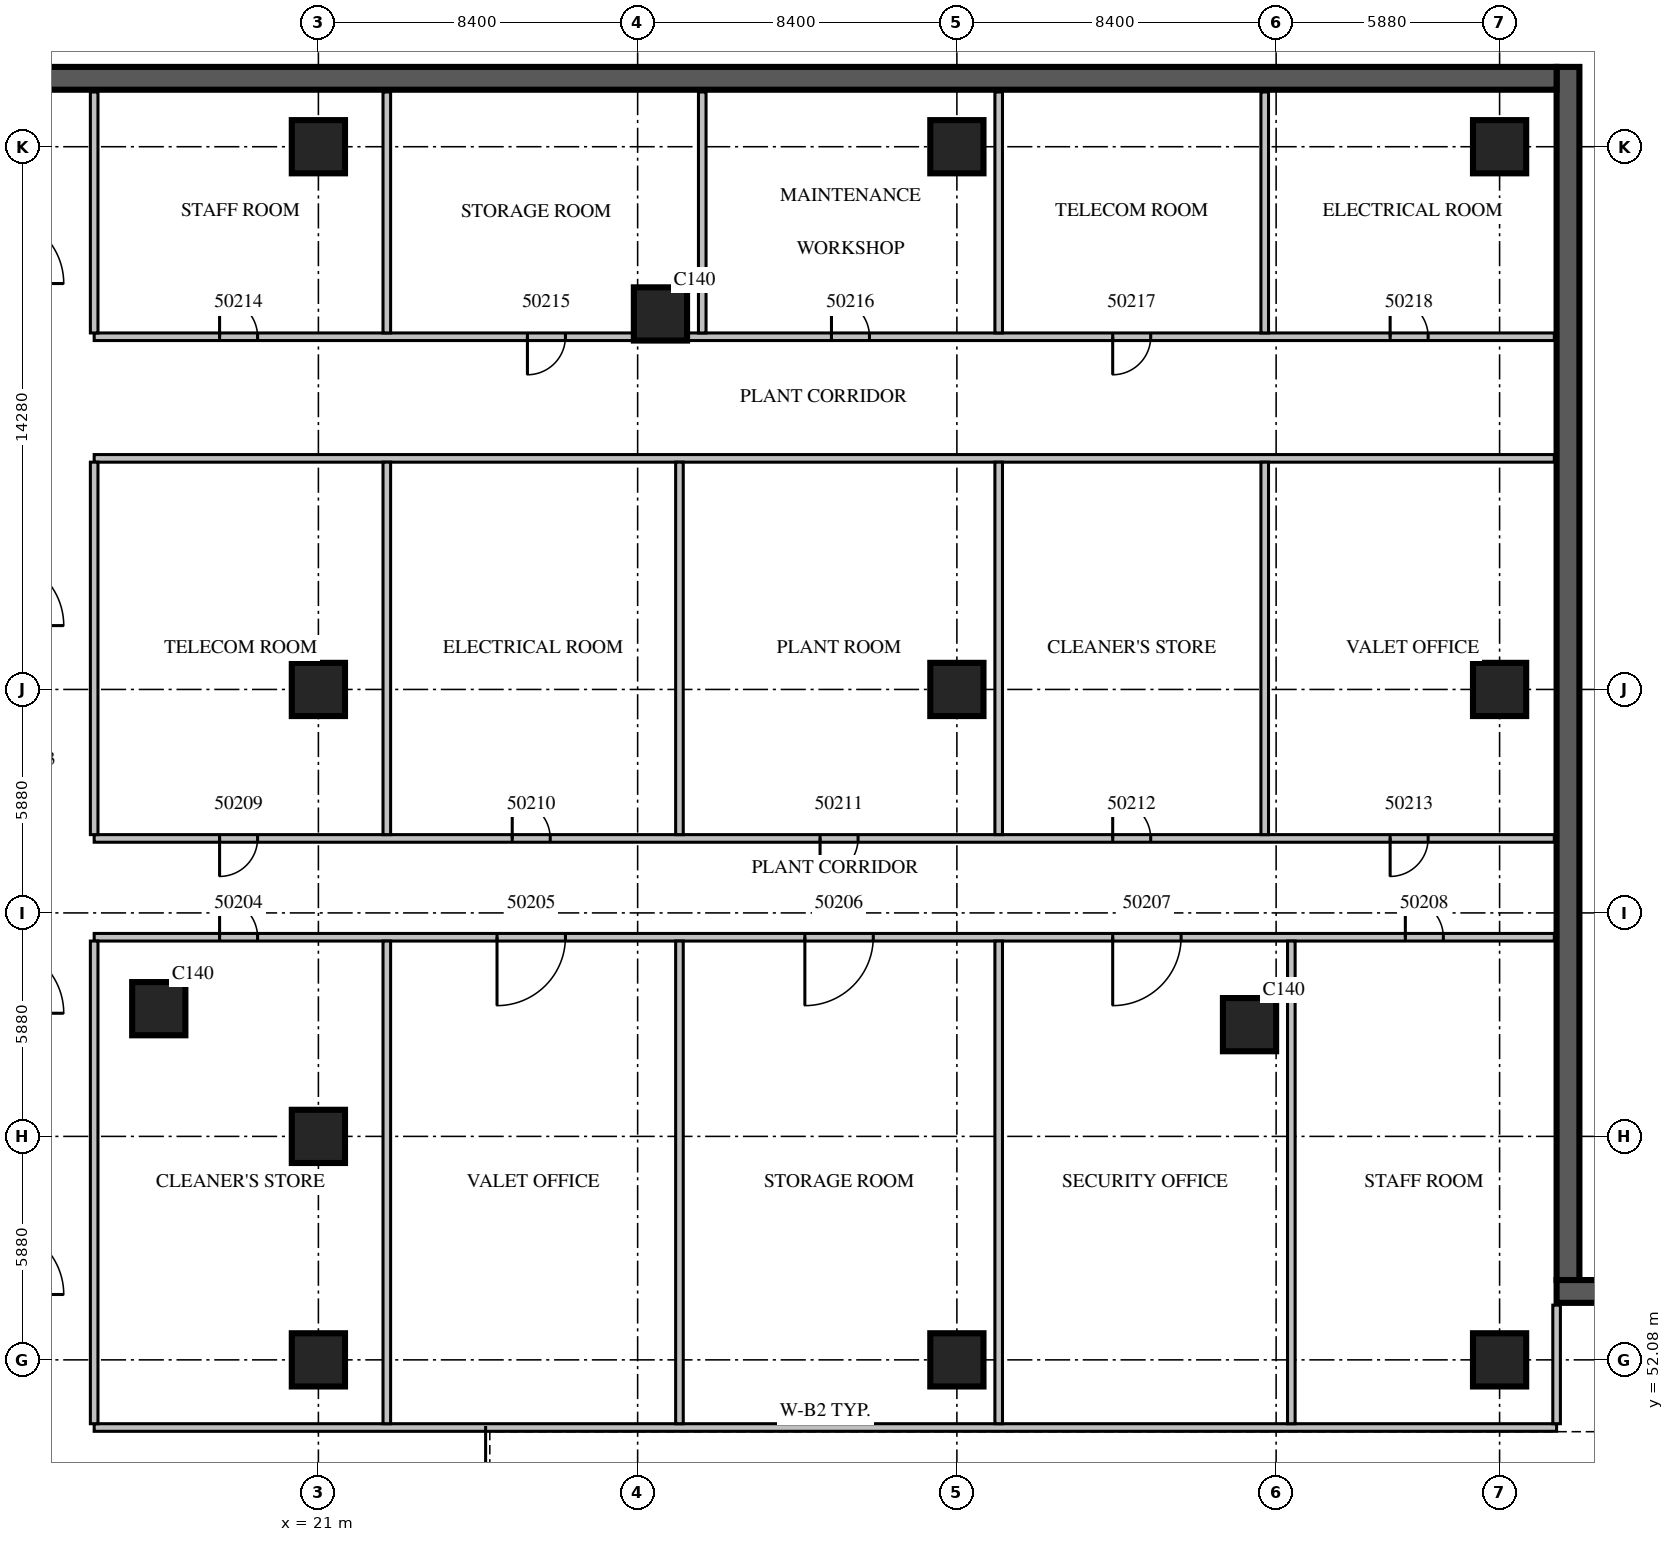
"""IFC4 building model, lengths in metres.
Left out: names, types, materials, properties, quantities, classifications, styles, units other than length and angle.
Written with IfcOpenShell. Run it as: python <this file> out.ifc"""

import sys

from ifc_helpers import new_model, si_unit, direction, frame, frame_2d, origin, origin_2d, place, context, subcontext, project, spatial, rectangle, extrude, source, transform, mapped, element, fill, save


model = new_model("IFC4")
c1 = context("Model", 3, precision=1e-05, world=origin(), true_north=direction((0.0, 1.0)))
c2 = subcontext(c1, "Body", "Model", "MODEL_VIEW")
j1 = project(units=[si_unit("LENGTHUNIT", "METRE"), si_unit("PLANEANGLEUNIT", "RADIAN")], contexts=[c1])
p1 = place(None, origin())
s1 = spatial("IfcSite", under=j1, at=p1, CompositionType="ELEMENT")
p2 = place(p1, origin())
s2 = spatial("IfcBuilding", under=s1, at=p2, CompositionType="ELEMENT")
p3 = place(p2, frame((0.0, 0.0, -4.5)))
s3 = spatial("IfcBuildingStorey", under=s2, at=p3, CompositionType="ELEMENT", Elevation=-4.5)
m1 = source(origin(), c2, "Body", "SweptSolid", [
    extrude(rectangle(XDim=31.92, YDim=0.6, at=frame_2d((15.96, 0.0))), origin(), (0.0, 0.0, 1.0), 4.5),
])
p4 = place(p3, frame((53.88, 54.18, 0.0), z_axis=(0.0, 0.0, 1.0), x_axis=(0.0, 1.0, 0.0)))
e1 = element("IfcWall", 1, at=p4, inside=s3, PredefinedType="SOLIDWALL", context=c2, shape_type="MappedRepresentation", body=[
    mapped(m1, transform((0.0, 0.0, 0.0), scale=1.0)),
])
m2 = source(origin(), c2, "Body", "SweptSolid", [
    extrude(rectangle(XDim=55.68, YDim=0.6, at=frame_2d((27.84, 0.0))), origin(), (0.0, 0.0, 1.0), 4.5),
])
p5 = place(p3, frame((53.58, 85.8, 0.0), z_axis=(0.0, 0.0, 1.0), x_axis=(-1.0, 0.0, 0.0)))
e2 = element("IfcWall", 2, at=p5, inside=s3, PredefinedType="SOLIDWALL", context=c2, shape_type="MappedRepresentation", body=[
    mapped(m2, transform((0.0, 0.0, 0.0), scale=1.0)),
])
p6 = place(p3, frame((85.5, 53.88, 0.0), z_axis=(0.0, 0.0, 1.0), x_axis=(-1.0, 0.0, 0.0)))
e3 = element("IfcWall", 3, at=p6, inside=s3, PredefinedType="SOLIDWALL", context=c2, shape_type="MappedRepresentation", body=[
    mapped(m1, transform((0.0, 0.0, 0.0), scale=1.0)),
])
m3 = source(origin(), c2, "Body", "SweptSolid", [
    extrude(rectangle(XDim=1.4, YDim=1.4, at=origin_2d()), origin(), (0.0, 0.0, 1.0), 4.5),
])
for number, where, z_axis, x_axis in (
    (4, (16.8, 61.32, 0.0), (0.0, 0.0, 1.0), (1.0, 0.0, 0.0)),
    (5, (21.0, 52.08, 0.0), (0.0, 0.0, 1.0), (1.0, 0.0, 0.0)),
    (6, (21.0, 57.96, 0.0), (0.0, 0.0, 1.0), (1.0, 0.0, 0.0)),
    (7, (21.0, 69.72, 0.0), (0.0, 0.0, 1.0), (1.0, 0.0, 0.0)),
    (8, (21.0, 84.0, 0.0), (0.0, 0.0, 1.0), (1.0, 0.0, 0.0)),
    (9, (30.0, 79.6, 0.0), (0.0, 0.0, 1.0), (1.0, 0.0, 0.0)),
    (10, (37.8, 52.08, 0.0), (0.0, 0.0, 1.0), (1.0, 0.0, 0.0)),
    (11, (37.8, 69.72, 0.0), (0.0, 0.0, 1.0), (1.0, 0.0, 0.0)),
    (12, (37.8, 84.0, 0.0), (0.0, 0.0, 1.0), (1.0, 0.0, 0.0)),
    (13, (45.5, 60.9, 0.0), (0.0, 0.0, 1.0), (1.0, 0.0, 0.0)),
    (14, (52.08, 52.08, 0.0), (0.0, 0.0, 1.0), (1.0, 0.0, 0.0)),
    (15, (52.08, 69.72, 0.0), (0.0, 0.0, 1.0), (1.0, 0.0, 0.0)),
    (16, (52.08, 84.0, 0.0), (0.0, 0.0, 1.0), (1.0, 0.0, 0.0)),
):
    element("IfcColumn", number, at=place(p3, frame(where, z_axis=z_axis, x_axis=x_axis)), inside=s3, PredefinedType="COLUMN", context=c2, shape_type="MappedRepresentation", body=[
        mapped(m3, transform((0.0, 0.0, 0.0), scale=1.0)),
    ])
m4 = source(origin(), c2, "Body", "SweptSolid", [
    extrude(rectangle(XDim=38.48, YDim=0.2, at=frame_2d((19.24, 0.0))), origin(), (0.0, 0.0, 1.0), 3.9),
])
p7 = place(p3, frame((15.1, 50.3, 0.0), z_axis=(0.0, 0.0, 1.0), x_axis=(1.0, 0.0, 0.0)))
e17 = element("IfcWall", 17, at=p7, inside=s3, PredefinedType="PARTITIONING", context=c2, shape_type="MappedRepresentation", body=[
    mapped(m4, transform((0.0, 0.0, 0.0), scale=1.0)),
])
m5 = source(origin(), c2, "Body", "SweptSolid", [
    extrude(rectangle(XDim=38.42, YDim=0.2, at=frame_2d((19.21, 0.0))), origin(), (0.0, 0.0, 1.0), 3.9),
])
p8 = place(p3, frame((15.1, 63.2, 0.0), z_axis=(0.0, 0.0, 1.0), x_axis=(1.0, 0.0, 0.0)))
e18 = element("IfcWall", 18, at=p8, inside=s3, PredefinedType="PARTITIONING", context=c2, shape_type="MappedRepresentation", body=[
    mapped(m5, transform((0.0, 0.0, 0.0), scale=1.0)),
])
m6 = source(origin(), c2, "Body", "SweptSolid", [
    extrude(rectangle(XDim=1.0, YDim=2.1, at=frame_2d((0.5, 1.05))), frame((0.0, 0.11, 0.0), z_axis=(0.0, -1.0, 0.0), x_axis=(1.0, 0.0, 0.0)), (0.0, 0.0, 1.0), 0.22),
])
p9 = place(p8, frame((3.3, 0.0, 0.0)))
e19 = element("IfcOpeningElement", 19, at=p9, cuts=e18, PredefinedType="OPENING", context=c2, shape_type="MappedRepresentation", body=[
    mapped(m6, transform((0.0, 0.0, 0.0), scale=1.0)),
])
m7 = source(origin(), c2, "Body", "SweptSolid", [
    extrude(rectangle(XDim=1.8, YDim=2.1, at=frame_2d((0.9, 1.05))), frame((0.0, 0.11, 0.0), z_axis=(0.0, -1.0, 0.0), x_axis=(1.0, 0.0, 0.0)), (0.0, 0.0, 1.0), 0.22),
])
p10 = place(p8, frame((10.6, 0.0, 0.0)))
e20 = element("IfcOpeningElement", 20, at=p10, cuts=e18, PredefinedType="OPENING", context=c2, shape_type="MappedRepresentation", body=[
    mapped(m7, transform((0.0, 0.0, 0.0), scale=1.0)),
])
p11 = place(p8, frame((18.7, 0.0, 0.0)))
e21 = element("IfcOpeningElement", 21, at=p11, cuts=e18, PredefinedType="OPENING", context=c2, shape_type="MappedRepresentation", body=[
    mapped(m7, transform((0.0, 0.0, 0.0), scale=1.0)),
])
p12 = place(p8, frame((26.8, 0.0, 0.0)))
e22 = element("IfcOpeningElement", 22, at=p12, cuts=e18, PredefinedType="OPENING", context=c2, shape_type="MappedRepresentation", body=[
    mapped(m7, transform((0.0, 0.0, 0.0), scale=1.0)),
])
p13 = place(p8, frame((34.5, 0.0, 0.0)))
e23 = element("IfcOpeningElement", 23, at=p13, cuts=e18, PredefinedType="OPENING", context=c2, shape_type="MappedRepresentation", body=[
    mapped(m6, transform((0.0, 0.0, 0.0), scale=1.0)),
])
p14 = place(p3, frame((15.1, 65.8, 0.0), z_axis=(0.0, 0.0, 1.0), x_axis=(1.0, 0.0, 0.0)))
e24 = element("IfcWall", 24, at=p14, inside=s3, PredefinedType="PARTITIONING", context=c2, shape_type="MappedRepresentation", body=[
    mapped(m5, transform((0.0, 0.0, 0.0), scale=1.0)),
])
p15 = place(p14, frame((3.3, 0.0, 0.0)))
e25 = element("IfcOpeningElement", 25, at=p15, cuts=e24, PredefinedType="OPENING", context=c2, shape_type="MappedRepresentation", body=[
    mapped(m6, transform((0.0, 0.0, 0.0), scale=1.0)),
])
p16 = place(p14, frame((11.0, 0.0, 0.0)))
e26 = element("IfcOpeningElement", 26, at=p16, cuts=e24, PredefinedType="OPENING", context=c2, shape_type="MappedRepresentation", body=[
    mapped(m6, transform((0.0, 0.0, 0.0), scale=1.0)),
])
p17 = place(p14, frame((19.1, 0.0, 0.0)))
e27 = element("IfcOpeningElement", 27, at=p17, cuts=e24, PredefinedType="OPENING", context=c2, shape_type="MappedRepresentation", body=[
    mapped(m6, transform((0.0, 0.0, 0.0), scale=1.0)),
])
p18 = place(p14, frame((26.8, 0.0, 0.0)))
e28 = element("IfcOpeningElement", 28, at=p18, cuts=e24, PredefinedType="OPENING", context=c2, shape_type="MappedRepresentation", body=[
    mapped(m6, transform((0.0, 0.0, 0.0), scale=1.0)),
])
p19 = place(p14, frame((34.1, 0.0, 0.0)))
e29 = element("IfcOpeningElement", 29, at=p19, cuts=e24, PredefinedType="OPENING", context=c2, shape_type="MappedRepresentation", body=[
    mapped(m6, transform((0.0, 0.0, 0.0), scale=1.0)),
])
p20 = place(p3, frame((15.1, 75.8, 0.0), z_axis=(0.0, 0.0, 1.0), x_axis=(1.0, 0.0, 0.0)))
e30 = element("IfcWall", 30, at=p20, inside=s3, PredefinedType="PARTITIONING", context=c2, shape_type="MappedRepresentation", body=[
    mapped(m5, transform((0.0, 0.0, 0.0), scale=1.0)),
])
p21 = place(p3, frame((15.1, 79.0, 0.0), z_axis=(0.0, 0.0, 1.0), x_axis=(1.0, 0.0, 0.0)))
e31 = element("IfcWall", 31, at=p21, inside=s3, PredefinedType="PARTITIONING", context=c2, shape_type="MappedRepresentation", body=[
    mapped(m5, transform((0.0, 0.0, 0.0), scale=1.0)),
])
p22 = place(p21, frame((3.3, 0.0, 0.0)))
e32 = element("IfcOpeningElement", 32, at=p22, cuts=e31, PredefinedType="OPENING", context=c2, shape_type="MappedRepresentation", body=[
    mapped(m6, transform((0.0, 0.0, 0.0), scale=1.0)),
])
p23 = place(p21, frame((11.4, 0.0, 0.0)))
e33 = element("IfcOpeningElement", 33, at=p23, cuts=e31, PredefinedType="OPENING", context=c2, shape_type="MappedRepresentation", body=[
    mapped(m6, transform((0.0, 0.0, 0.0), scale=1.0)),
])
p24 = place(p21, frame((19.4, 0.0, 0.0)))
e34 = element("IfcOpeningElement", 34, at=p24, cuts=e31, PredefinedType="OPENING", context=c2, shape_type="MappedRepresentation", body=[
    mapped(m6, transform((0.0, 0.0, 0.0), scale=1.0)),
])
p25 = place(p21, frame((26.8, 0.0, 0.0)))
e35 = element("IfcOpeningElement", 35, at=p25, cuts=e31, PredefinedType="OPENING", context=c2, shape_type="MappedRepresentation", body=[
    mapped(m6, transform((0.0, 0.0, 0.0), scale=1.0)),
])
p26 = place(p21, frame((34.1, 0.0, 0.0)))
e36 = element("IfcOpeningElement", 36, at=p26, cuts=e31, PredefinedType="OPENING", context=c2, shape_type="MappedRepresentation", body=[
    mapped(m6, transform((0.0, 0.0, 0.0), scale=1.0)),
])
m8 = source(origin(), c2, "Body", "SweptSolid", [
    extrude(rectangle(XDim=12.7, YDim=0.2, at=frame_2d((6.35, 0.0))), origin(), (0.0, 0.0, 1.0), 3.9),
])
p27 = place(p3, frame((15.1, 50.4, 0.0), z_axis=(0.0, 0.0, 1.0), x_axis=(0.0, 1.0, 0.0)))
e37 = element("IfcWall", 37, at=p27, inside=s3, PredefinedType="PARTITIONING", context=c2, shape_type="MappedRepresentation", body=[
    mapped(m8, transform((0.0, 0.0, 0.0), scale=1.0)),
])
m9 = source(origin(), c2, "Body", "SweptSolid", [
    extrude(rectangle(XDim=9.8, YDim=0.2, at=frame_2d((4.9, 0.0))), origin(), (0.0, 0.0, 1.0), 3.9),
])
p28 = place(p3, frame((15.1, 65.9, 0.0), z_axis=(0.0, 0.0, 1.0), x_axis=(0.0, 1.0, 0.0)))
e38 = element("IfcWall", 38, at=p28, inside=s3, PredefinedType="PARTITIONING", context=c2, shape_type="MappedRepresentation", body=[
    mapped(m9, transform((0.0, 0.0, 0.0), scale=1.0)),
])
m10 = source(origin(), c2, "Body", "SweptSolid", [
    extrude(rectangle(XDim=6.34, YDim=0.2, at=frame_2d((3.17, 0.0))), origin(), (0.0, 0.0, 1.0), 3.9),
])
p29 = place(p3, frame((15.1, 79.1, 0.0), z_axis=(0.0, 0.0, 1.0), x_axis=(0.0, 1.0, 0.0)))
e39 = element("IfcWall", 39, at=p29, inside=s3, PredefinedType="PARTITIONING", context=c2, shape_type="MappedRepresentation", body=[
    mapped(m10, transform((0.0, 0.0, 0.0), scale=1.0)),
])
p30 = place(p3, frame((22.8, 50.4, 0.0), z_axis=(0.0, 0.0, 1.0), x_axis=(0.0, 1.0, 0.0)))
e40 = element("IfcWall", 40, at=p30, inside=s3, PredefinedType="PARTITIONING", context=c2, shape_type="MappedRepresentation", body=[
    mapped(m8, transform((0.0, 0.0, 0.0), scale=1.0)),
])
p31 = place(p3, frame((22.8, 65.9, 0.0), z_axis=(0.0, 0.0, 1.0), x_axis=(0.0, 1.0, 0.0)))
e41 = element("IfcWall", 41, at=p31, inside=s3, PredefinedType="PARTITIONING", context=c2, shape_type="MappedRepresentation", body=[
    mapped(m9, transform((0.0, 0.0, 0.0), scale=1.0)),
])
p32 = place(p3, frame((22.8, 79.1, 0.0), z_axis=(0.0, 0.0, 1.0), x_axis=(0.0, 1.0, 0.0)))
e42 = element("IfcWall", 42, at=p32, inside=s3, PredefinedType="PARTITIONING", context=c2, shape_type="MappedRepresentation", body=[
    mapped(m10, transform((0.0, 0.0, 0.0), scale=1.0)),
])
p33 = place(p3, frame((30.5, 50.4, 0.0), z_axis=(0.0, 0.0, 1.0), x_axis=(0.0, 1.0, 0.0)))
e43 = element("IfcWall", 43, at=p33, inside=s3, PredefinedType="PARTITIONING", context=c2, shape_type="MappedRepresentation", body=[
    mapped(m8, transform((0.0, 0.0, 0.0), scale=1.0)),
])
p34 = place(p3, frame((30.5, 65.9, 0.0), z_axis=(0.0, 0.0, 1.0), x_axis=(0.0, 1.0, 0.0)))
e44 = element("IfcWall", 44, at=p34, inside=s3, PredefinedType="PARTITIONING", context=c2, shape_type="MappedRepresentation", body=[
    mapped(m9, transform((0.0, 0.0, 0.0), scale=1.0)),
])
p35 = place(p3, frame((31.1, 79.1, 0.0), z_axis=(0.0, 0.0, 1.0), x_axis=(0.0, 1.0, 0.0)))
e45 = element("IfcWall", 45, at=p35, inside=s3, PredefinedType="PARTITIONING", context=c2, shape_type="MappedRepresentation", body=[
    mapped(m10, transform((0.0, 0.0, 0.0), scale=1.0)),
])
p36 = place(p3, frame((38.9, 50.4, 0.0), z_axis=(0.0, 0.0, 1.0), x_axis=(0.0, 1.0, 0.0)))
e46 = element("IfcWall", 46, at=p36, inside=s3, PredefinedType="PARTITIONING", context=c2, shape_type="MappedRepresentation", body=[
    mapped(m8, transform((0.0, 0.0, 0.0), scale=1.0)),
])
p37 = place(p3, frame((38.9, 65.9, 0.0), z_axis=(0.0, 0.0, 1.0), x_axis=(0.0, 1.0, 0.0)))
e47 = element("IfcWall", 47, at=p37, inside=s3, PredefinedType="PARTITIONING", context=c2, shape_type="MappedRepresentation", body=[
    mapped(m9, transform((0.0, 0.0, 0.0), scale=1.0)),
])
p38 = place(p3, frame((38.9, 79.1, 0.0), z_axis=(0.0, 0.0, 1.0), x_axis=(0.0, 1.0, 0.0)))
e48 = element("IfcWall", 48, at=p38, inside=s3, PredefinedType="PARTITIONING", context=c2, shape_type="MappedRepresentation", body=[
    mapped(m10, transform((0.0, 0.0, 0.0), scale=1.0)),
])
p39 = place(p3, frame((45.9, 65.9, 0.0), z_axis=(0.0, 0.0, 1.0), x_axis=(0.0, 1.0, 0.0)))
e49 = element("IfcWall", 49, at=p39, inside=s3, PredefinedType="PARTITIONING", context=c2, shape_type="MappedRepresentation", body=[
    mapped(m9, transform((0.0, 0.0, 0.0), scale=1.0)),
])
p40 = place(p3, frame((45.9, 79.1, 0.0), z_axis=(0.0, 0.0, 1.0), x_axis=(0.0, 1.0, 0.0)))
e50 = element("IfcWall", 50, at=p40, inside=s3, PredefinedType="PARTITIONING", context=c2, shape_type="MappedRepresentation", body=[
    mapped(m10, transform((0.0, 0.0, 0.0), scale=1.0)),
])
p41 = place(p3, frame((46.6, 50.4, 0.0), z_axis=(0.0, 0.0, 1.0), x_axis=(0.0, 1.0, 0.0)))
e51 = element("IfcWall", 51, at=p41, inside=s3, PredefinedType="PARTITIONING", context=c2, shape_type="MappedRepresentation", body=[
    mapped(m8, transform((0.0, 0.0, 0.0), scale=1.0)),
])
m11 = source(origin(), c2, "Body", "SweptSolid", [
    extrude(rectangle(XDim=3.12, YDim=0.2, at=frame_2d((1.56, 0.0))), origin(), (0.0, 0.0, 1.0), 3.9),
])
p42 = place(p3, frame((53.58, 50.4, 0.0), z_axis=(0.0, 0.0, 1.0), x_axis=(0.0, 1.0, 0.0)))
e52 = element("IfcWall", 52, at=p42, inside=s3, PredefinedType="PARTITIONING", context=c2, shape_type="MappedRepresentation", body=[
    mapped(m11, transform((0.0, 0.0, 0.0), scale=1.0)),
])
m12 = source(origin(), c2, "Body", "SweptSolid", [
    extrude(rectangle(XDim=1.0, YDim=2.1, at=frame_2d((0.5, 1.05))), frame((0.0, 0.025, 0.0), z_axis=(0.0, -1.0, 0.0), x_axis=(1.0, 0.0, 0.0)), (0.0, 0.0, 1.0), 0.05),
])
p43 = place(p9, origin())
e53 = element("IfcDoor", 53, at=p43, inside=s3, OperationType="SINGLE_SWING_LEFT", PredefinedType="DOOR", context=c2, shape_type="MappedRepresentation", body=[
    mapped(m12, transform((0.0, 0.0, 0.0), scale=1.0)),
])
fill(e19, e53)
m13 = source(origin(), c2, "Body", "SweptSolid", [
    extrude(rectangle(XDim=1.8, YDim=2.1, at=frame_2d((0.9, 1.05))), frame((0.0, 0.025, 0.0), z_axis=(0.0, -1.0, 0.0), x_axis=(1.0, 0.0, 0.0)), (0.0, 0.0, 1.0), 0.05),
])
p44 = place(p10, origin())
e54 = element("IfcDoor", 54, at=p44, inside=s3, OperationType="DOUBLE_DOOR_SINGLE_SWING", PredefinedType="DOOR", context=c2, shape_type="MappedRepresentation", body=[
    mapped(m13, transform((0.0, 0.0, 0.0), scale=1.0)),
])
fill(e20, e54)
p45 = place(p11, origin())
e55 = element("IfcDoor", 55, at=p45, inside=s3, OperationType="DOUBLE_DOOR_SINGLE_SWING", PredefinedType="DOOR", context=c2, shape_type="MappedRepresentation", body=[
    mapped(m13, transform((0.0, 0.0, 0.0), scale=1.0)),
])
fill(e21, e55)
p46 = place(p12, origin())
e56 = element("IfcDoor", 56, at=p46, inside=s3, OperationType="DOUBLE_DOOR_SINGLE_SWING", PredefinedType="DOOR", context=c2, shape_type="MappedRepresentation", body=[
    mapped(m13, transform((0.0, 0.0, 0.0), scale=1.0)),
])
fill(e22, e56)
p47 = place(p13, origin())
e57 = element("IfcDoor", 57, at=p47, inside=s3, OperationType="SINGLE_SWING_LEFT", PredefinedType="DOOR", context=c2, shape_type="MappedRepresentation", body=[
    mapped(m12, transform((0.0, 0.0, 0.0), scale=1.0)),
])
fill(e23, e57)
p48 = place(p15, origin())
e58 = element("IfcDoor", 58, at=p48, inside=s3, OperationType="SINGLE_SWING_RIGHT", PredefinedType="DOOR", context=c2, shape_type="MappedRepresentation", body=[
    mapped(m12, transform((0.0, 0.0, 0.0), scale=1.0)),
])
fill(e25, e58)
p49 = place(p16, origin())
e59 = element("IfcDoor", 59, at=p49, inside=s3, OperationType="SINGLE_SWING_LEFT", PredefinedType="DOOR", context=c2, shape_type="MappedRepresentation", body=[
    mapped(m12, transform((0.0, 0.0, 0.0), scale=1.0)),
])
fill(e26, e59)
p50 = place(p17, origin())
e60 = element("IfcDoor", 60, at=p50, inside=s3, OperationType="SINGLE_SWING_RIGHT", PredefinedType="DOOR", context=c2, shape_type="MappedRepresentation", body=[
    mapped(m12, transform((0.0, 0.0, 0.0), scale=1.0)),
])
fill(e27, e60)
p51 = place(p18, origin())
e61 = element("IfcDoor", 61, at=p51, inside=s3, OperationType="SINGLE_SWING_LEFT", PredefinedType="DOOR", context=c2, shape_type="MappedRepresentation", body=[
    mapped(m12, transform((0.0, 0.0, 0.0), scale=1.0)),
])
fill(e28, e61)
p52 = place(p19, origin())
e62 = element("IfcDoor", 62, at=p52, inside=s3, OperationType="SINGLE_SWING_RIGHT", PredefinedType="DOOR", context=c2, shape_type="MappedRepresentation", body=[
    mapped(m12, transform((0.0, 0.0, 0.0), scale=1.0)),
])
fill(e29, e62)
p53 = place(p22, origin())
e63 = element("IfcDoor", 63, at=p53, inside=s3, OperationType="SINGLE_SWING_LEFT", PredefinedType="DOOR", context=c2, shape_type="MappedRepresentation", body=[
    mapped(m12, transform((0.0, 0.0, 0.0), scale=1.0)),
])
fill(e32, e63)
p54 = place(p23, origin())
e64 = element("IfcDoor", 64, at=p54, inside=s3, OperationType="SINGLE_SWING_RIGHT", PredefinedType="DOOR", context=c2, shape_type="MappedRepresentation", body=[
    mapped(m12, transform((0.0, 0.0, 0.0), scale=1.0)),
])
fill(e33, e64)
p55 = place(p24, origin())
e65 = element("IfcDoor", 65, at=p55, inside=s3, OperationType="SINGLE_SWING_LEFT", PredefinedType="DOOR", context=c2, shape_type="MappedRepresentation", body=[
    mapped(m12, transform((0.0, 0.0, 0.0), scale=1.0)),
])
fill(e34, e65)
p56 = place(p25, origin())
e66 = element("IfcDoor", 66, at=p56, inside=s3, OperationType="SINGLE_SWING_RIGHT", PredefinedType="DOOR", context=c2, shape_type="MappedRepresentation", body=[
    mapped(m12, transform((0.0, 0.0, 0.0), scale=1.0)),
])
fill(e35, e66)
p57 = place(p26, origin())
e67 = element("IfcDoor", 67, at=p57, inside=s3, OperationType="SINGLE_SWING_LEFT", PredefinedType="DOOR", context=c2, shape_type="MappedRepresentation", body=[
    mapped(m12, transform((0.0, 0.0, 0.0), scale=1.0)),
])
fill(e36, e67)
save(model, sys.argv[1])
